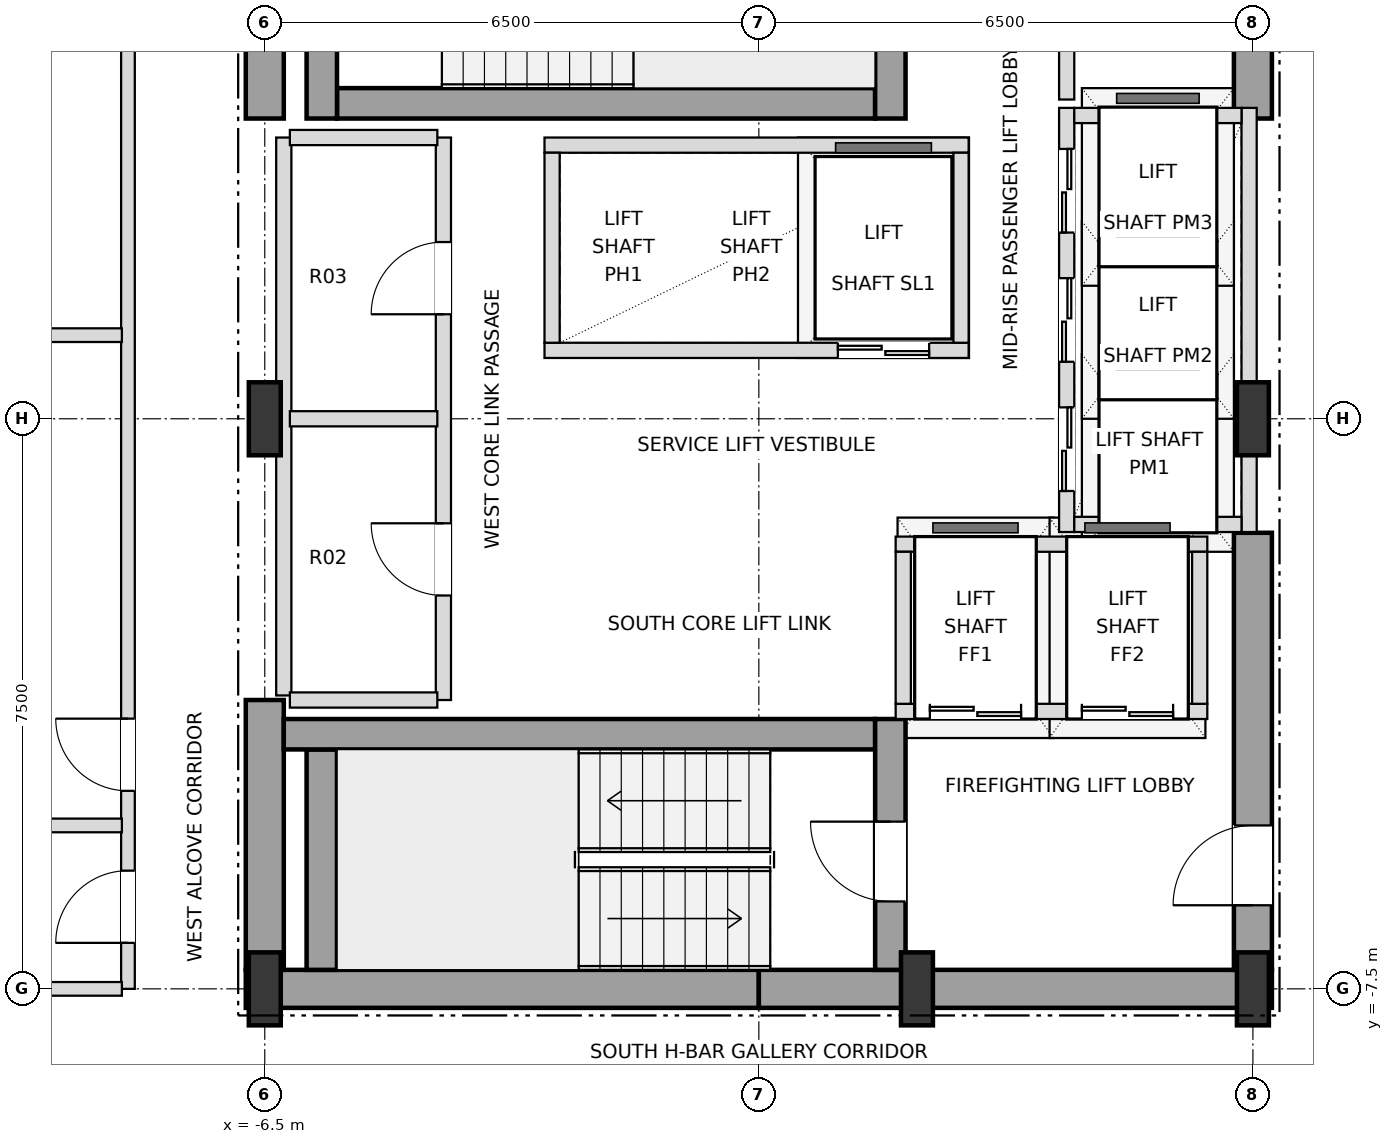
"""IFC4 building model, lengths in metres.
Left out: names, types, materials, properties, quantities, classifications, styles, units other than length and angle.
Written with IfcOpenShell. Run it as: python <this file> out.ifc"""

import sys

from ifc_helpers import new_model, si_unit, direction, frame, frame_2d, origin, origin_2d, place, context, subcontext, project, spatial, rectangle, i_section, extrude, element, fill, save


model = new_model("IFC4")
c1 = context("Model", 3, precision=1e-05, world=origin(), true_north=direction((0.0, 1.0)))
c2 = subcontext(c1, "Body", "Model", "MODEL_VIEW")
j1 = project(units=[si_unit("LENGTHUNIT", "METRE"), si_unit("PLANEANGLEUNIT", "RADIAN")], contexts=[c1])
p1 = place(None, origin())
s1 = spatial("IfcSite", under=j1, at=p1, CompositionType="ELEMENT")
p2 = place(p1, origin())
s2 = spatial("IfcBuilding", under=s1, at=p2, CompositionType="ELEMENT")
p3 = place(p2, frame((0.0, 0.0, 154.8)))
s3 = spatial("IfcBuildingStorey", under=s2, at=p3, CompositionType="ELEMENT", Elevation=154.8)
for number, where, z_axis, x_axis in (
    (1, (-6.5, -7.5, 0.0), (0.0, 0.0, 1.0), (1.0, 0.0, 0.0)),
    (2, (2.08, -7.5, 0.0), (0.0, 0.0, 1.0), (1.0, 0.0, 0.0)),
    (3, (6.5, -7.5, 0.0), (0.0, 0.0, 1.0), (1.0, 0.0, 0.0)),
    (4, (-6.5, 0.0, 0.0), (0.0, 0.0, 1.0), (1.0, 0.0, 0.0)),
    (5, (6.5, 0.0, 0.0), (0.0, 0.0, 1.0), (1.0, 0.0, 0.0)),
):
    element("IfcColumn", number, at=place(p3, frame(where, z_axis=z_axis, x_axis=x_axis)), inside=s3, PredefinedType="COLUMN", context=c2, shape_type="SweptSolid", body=[
        extrude(i_section(OverallWidth=0.42, OverallDepth=0.96, WebThickness=0.022, FlangeThickness=0.034, at=origin_2d()), origin(), (0.0, 0.0, 1.0), 3.6),
    ])
for number, where, z_axis, x_axis in (
    (6, (-6.75, -7.5, 0.0), (0.0, 0.0, 1.0), (1.0, 0.0, 0.0)),
    (7, (0.0, -7.5, 0.0), (0.0, 0.0, 1.0), (1.0, 0.0, 0.0)),
):
    element("IfcWall", number, at=place(p3, frame(where, z_axis=z_axis, x_axis=x_axis)), inside=s3, PredefinedType="SHEAR", context=c2, shape_type="SweptSolid", body=[
        extrude(rectangle(XDim=6.75, YDim=0.5, at=frame_2d((3.375, 0.0))), origin(), (0.0, 0.0, 1.0), 3.38),
    ])
p4 = place(p3, frame((-6.5, -7.25, 0.0), z_axis=(0.0, 0.0, 1.0), x_axis=(0.0, 1.0, 0.0)))
e8 = element("IfcWall", 8, at=p4, inside=s3, PredefinedType="SHEAR", context=c2, shape_type="SweptSolid", body=[
    extrude(rectangle(XDim=3.55, YDim=0.5, at=frame_2d((1.775, 0.0))), origin(), (0.0, 0.0, 1.0), 3.38),
])
p5 = place(p3, frame((-6.5, 3.95, 0.0), z_axis=(0.0, 0.0, 1.0), x_axis=(0.0, 1.0, 0.0)))
e9 = element("IfcWall", 9, at=p5, inside=s3, PredefinedType="SHEAR", context=c2, shape_type="SweptSolid", body=[
    extrude(rectangle(XDim=3.3, YDim=0.5, at=frame_2d((1.65, 0.0))), origin(), (0.0, 0.0, 1.0), 3.38),
])
p6 = place(p3, frame((6.5, -7.25, 0.0), z_axis=(0.0, 0.0, 1.0), x_axis=(0.0, 1.0, 0.0)))
e10 = element("IfcWall", 10, at=p6, inside=s3, PredefinedType="SHEAR", context=c2, shape_type="SweptSolid", body=[
    extrude(rectangle(XDim=5.75, YDim=0.5, at=frame_2d((2.875, 0.0))), origin(), (0.0, 0.0, 1.0), 3.38),
])
p7 = place(p6, frame((0.85, 0.0, 0.0)))
e11 = element("IfcOpeningElement", 11, at=p7, cuts=e10, PredefinedType="OPENING", context=c2, shape_type="SweptSolid", body=[
    extrude(rectangle(XDim=1.05, YDim=2.15, at=frame_2d((0.525, 1.075))), frame((0.0, 0.26, 0.0), z_axis=(0.0, -1.0, 0.0), x_axis=(1.0, 0.0, 0.0)), (0.0, 0.0, 1.0), 0.52),
])
p8 = place(p3, frame((6.5, 3.95, 0.0), z_axis=(0.0, 0.0, 1.0), x_axis=(0.0, 1.0, 0.0)))
e12 = element("IfcWall", 12, at=p8, inside=s3, PredefinedType="SHEAR", context=c2, shape_type="SweptSolid", body=[
    extrude(rectangle(XDim=3.3, YDim=0.5, at=frame_2d((1.65, 0.0))), origin(), (0.0, 0.0, 1.0), 3.38),
])
p9 = place(p3, frame((-5.75, -7.25, 0.0), z_axis=(0.0, 0.0, 1.0), x_axis=(0.0, 1.0, 0.0)))
e13 = element("IfcWall", 13, at=p9, inside=s3, PredefinedType="SHEAR", context=c2, shape_type="SweptSolid", body=[
    extrude(rectangle(XDim=2.9, YDim=0.4, at=frame_2d((1.45, 0.0))), origin(), (0.0, 0.0, 1.0), 3.38),
])
p10 = place(p3, frame((-6.25, -4.15, 0.0), z_axis=(0.0, 0.0, 1.0), x_axis=(1.0, 0.0, 0.0)))
e14 = element("IfcWall", 14, at=p10, inside=s3, PredefinedType="SHEAR", context=c2, shape_type="SweptSolid", body=[
    extrude(rectangle(XDim=7.78, YDim=0.4, at=frame_2d((3.89, 0.0))), origin(), (0.0, 0.0, 1.0), 3.38),
])
p11 = place(p3, frame((1.73, -7.25, 0.0), z_axis=(0.0, 0.0, 1.0), x_axis=(0.0, 1.0, 0.0)))
e15 = element("IfcWall", 15, at=p11, inside=s3, PredefinedType="SHEAR", context=c2, shape_type="SweptSolid", body=[
    extrude(rectangle(XDim=3.3, YDim=0.4, at=frame_2d((1.65, 0.0))), origin(), (0.0, 0.0, 1.0), 3.38),
])
p12 = place(p11, frame((0.9, 0.0, 0.0)))
e16 = element("IfcOpeningElement", 16, at=p12, cuts=e15, PredefinedType="OPENING", context=c2, shape_type="SweptSolid", body=[
    extrude(rectangle(XDim=1.05, YDim=2.15, at=frame_2d((0.525, 1.075))), frame((0.0, 0.21, 0.0), z_axis=(0.0, -1.0, 0.0), x_axis=(1.0, 0.0, 0.0)), (0.0, 0.0, 1.0), 0.42),
])
p13 = place(p3, frame((-5.55, 4.15, 0.0), z_axis=(0.0, 0.0, 1.0), x_axis=(1.0, 0.0, 0.0)))
e17 = element("IfcWall", 17, at=p13, inside=s3, PredefinedType="SHEAR", context=c2, shape_type="SweptSolid", body=[
    extrude(rectangle(XDim=7.08, YDim=0.4, at=frame_2d((3.54, 0.0))), origin(), (0.0, 0.0, 1.0), 3.38),
])
for number, where, z_axis, x_axis in (
    (18, (1.73, 3.95, 0.0), (0.0, 0.0, 1.0), (0.0, 1.0, 0.0)),
    (19, (-5.75, 3.95, 0.0), (0.0, 0.0, 1.0), (0.0, 1.0, 0.0)),
):
    element("IfcWall", number, at=place(p3, frame(where, z_axis=z_axis, x_axis=x_axis)), inside=s3, PredefinedType="SHEAR", context=c2, shape_type="SweptSolid", body=[
        extrude(rectangle(XDim=3.3, YDim=0.4, at=frame_2d((1.65, 0.0))), origin(), (0.0, 0.0, 1.0), 3.38),
    ])
p14 = place(p3, frame((4.05, -1.49, 0.0), z_axis=(0.0, 0.0, 1.0), x_axis=(0.0, 1.0, 0.0)))
e20 = element("IfcWall", 20, at=p14, inside=s3, PredefinedType="SOLIDWALL", context=c2, shape_type="SweptSolid", body=[
    extrude(rectangle(XDim=5.58, YDim=0.2, at=frame_2d((2.79, 0.0))), origin(), (0.0, 0.0, 1.0), 3.38),
])
p15 = place(p14, frame((0.54, 0.0, 0.0)))
e21 = element("IfcOpeningElement", 21, at=p15, cuts=e20, PredefinedType="OPENING", context=c2, shape_type="SweptSolid", body=[
    extrude(rectangle(XDim=1.1, YDim=2.15, at=frame_2d((0.55, 1.075))), frame((0.0, 0.11, 0.0), z_axis=(0.0, -1.0, 0.0), x_axis=(1.0, 0.0, 0.0)), (0.0, 0.0, 1.0), 0.22),
])
p16 = place(p14, frame((2.24, 0.0, 0.0)))
e22 = element("IfcOpeningElement", 22, at=p16, cuts=e20, PredefinedType="OPENING", context=c2, shape_type="SweptSolid", body=[
    extrude(rectangle(XDim=1.1, YDim=2.15, at=frame_2d((0.55, 1.075))), frame((0.0, 0.11, 0.0), z_axis=(0.0, -1.0, 0.0), x_axis=(1.0, 0.0, 0.0)), (0.0, 0.0, 1.0), 0.22),
])
p17 = place(p14, frame((3.94, 0.0, 0.0)))
e23 = element("IfcOpeningElement", 23, at=p17, cuts=e20, PredefinedType="OPENING", context=c2, shape_type="SweptSolid", body=[
    extrude(rectangle(XDim=1.1, YDim=2.15, at=frame_2d((0.55, 1.075))), frame((0.0, 0.11, 0.0), z_axis=(0.0, -1.0, 0.0), x_axis=(1.0, 0.0, 0.0)), (0.0, 0.0, 1.0), 0.22),
])
p18 = place(p3, frame((6.45, -1.49, 0.0), z_axis=(0.0, 0.0, 1.0), x_axis=(0.0, 1.0, 0.0)))
e24 = element("IfcWall", 24, at=p18, inside=s3, PredefinedType="SOLIDWALL", context=c2, shape_type="SweptSolid", body=[
    extrude(rectangle(XDim=5.58, YDim=0.2, at=frame_2d((2.79, 0.0))), origin(), (0.0, 0.0, 1.0), 2.816),
])
for number, where, z_axis, x_axis in (
    (25, (4.15, -1.39, 0.0), (0.0, 0.0, 1.0), (1.0, 0.0, 0.0)),
    (26, (4.15, 3.99, 0.0), (0.0, 0.0, 1.0), (1.0, 0.0, 0.0)),
):
    element("IfcWall", number, at=place(p3, frame(where, z_axis=z_axis, x_axis=x_axis)), inside=s3, PredefinedType="SOLIDWALL", context=c2, shape_type="SweptSolid", body=[
        extrude(rectangle(XDim=2.2, YDim=0.2, at=frame_2d((1.1, 0.0))), origin(), (0.0, 0.0, 1.0), 3.38),
    ])
p19 = place(p3, frame((-2.82, 0.9, 0.0), z_axis=(0.0, 0.0, 1.0), x_axis=(1.0, 0.0, 0.0)))
e27 = element("IfcWall", 27, at=p19, inside=s3, PredefinedType="SOLIDWALL", context=c2, shape_type="SweptSolid", body=[
    extrude(rectangle(XDim=5.58, YDim=0.2, at=frame_2d((2.79, 0.0))), origin(), (0.0, 0.0, 1.0), 3.38),
])
p20 = place(p19, frame((3.86, 0.0, 0.0)))
e28 = element("IfcOpeningElement", 28, at=p20, cuts=e27, PredefinedType="OPENING", context=c2, shape_type="SweptSolid", body=[
    extrude(rectangle(XDim=1.2, YDim=2.2, at=frame_2d((0.6, 1.1))), frame((0.0, 0.11, 0.0), z_axis=(0.0, -1.0, 0.0), x_axis=(1.0, 0.0, 0.0)), (0.0, 0.0, 1.0), 0.22),
])
p21 = place(p3, frame((-2.82, 3.6, 0.0), z_axis=(0.0, 0.0, 1.0), x_axis=(1.0, 0.0, 0.0)))
e29 = element("IfcWall", 29, at=p21, inside=s3, PredefinedType="SOLIDWALL", context=c2, shape_type="SweptSolid", body=[
    extrude(rectangle(XDim=5.58, YDim=0.2, at=frame_2d((2.79, 0.0))), origin(), (0.0, 0.0, 1.0), 3.38),
])
for number, where, z_axis, x_axis in (
    (30, (-2.72, 1.0, 0.0), (0.0, 0.0, 1.0), (0.0, 1.0, 0.0)),
    (31, (2.66, 1.0, 0.0), (0.0, 0.0, 1.0), (0.0, 1.0, 0.0)),
):
    element("IfcWall", number, at=place(p3, frame(where, z_axis=z_axis, x_axis=x_axis)), inside=s3, PredefinedType="SOLIDWALL", context=c2, shape_type="SweptSolid", body=[
        extrude(rectangle(XDim=2.5, YDim=0.2, at=frame_2d((1.25, 0.0))), origin(), (0.0, 0.0, 1.0), 3.38),
    ])
p22 = place(p3, frame((1.8, -3.85, 0.0), z_axis=(0.0, 0.0, 1.0), x_axis=(1.0, 0.0, 0.0)))
e32 = element("IfcWall", 32, at=p22, inside=s3, PredefinedType="SOLIDWALL", context=c2, shape_type="SweptSolid", body=[
    extrude(rectangle(XDim=4.1, YDim=0.2, at=frame_2d((2.05, 0.0))), origin(), (0.0, 0.0, 1.0), 3.38),
])
p23 = place(p22, frame((0.45, 0.0, 0.0)))
e33 = element("IfcOpeningElement", 33, at=p23, cuts=e32, PredefinedType="OPENING", context=c2, shape_type="SweptSolid", body=[
    extrude(rectangle(XDim=1.2, YDim=2.2, at=frame_2d((0.6, 1.1))), frame((0.0, 0.11, 0.0), z_axis=(0.0, -1.0, 0.0), x_axis=(1.0, 0.0, 0.0)), (0.0, 0.0, 1.0), 0.22),
])
p24 = place(p22, frame((2.45, 0.0, 0.0)))
e34 = element("IfcOpeningElement", 34, at=p24, cuts=e32, PredefinedType="OPENING", context=c2, shape_type="SweptSolid", body=[
    extrude(rectangle(XDim=1.2, YDim=2.2, at=frame_2d((0.6, 1.1))), frame((0.0, 0.11, 0.0), z_axis=(0.0, -1.0, 0.0), x_axis=(1.0, 0.0, 0.0)), (0.0, 0.0, 1.0), 0.22),
])
p25 = place(p3, frame((1.8, -1.65, 0.0), z_axis=(0.0, 0.0, 1.0), x_axis=(1.0, 0.0, 0.0)))
e35 = element("IfcWall", 35, at=p25, inside=s3, PredefinedType="SOLIDWALL", context=c2, shape_type="SweptSolid", body=[
    extrude(rectangle(XDim=4.1, YDim=0.2, at=frame_2d((2.05, 0.0))), origin(), (0.0, 0.0, 1.0), 3.38),
])
for number, where, z_axis, x_axis in (
    (36, (1.9, -3.75, 0.0), (0.0, 0.0, 1.0), (0.0, 1.0, 0.0)),
    (37, (5.8, -3.75, 0.0), (0.0, 0.0, 1.0), (0.0, 1.0, 0.0)),
):
    element("IfcWall", number, at=place(p3, frame(where, z_axis=z_axis, x_axis=x_axis)), inside=s3, PredefinedType="SOLIDWALL", context=c2, shape_type="SweptSolid", body=[
        extrude(rectangle(XDim=2.0, YDim=0.2, at=frame_2d((1.0, 0.0))), origin(), (0.0, 0.0, 1.0), 3.38),
    ])
p26 = place(p3, frame((-8.3, -7.5, 0.0), z_axis=(0.0, 0.0, 1.0), x_axis=(0.0, 1.0, 0.0)))
e38 = element("IfcWall", 38, at=p26, inside=s3, PredefinedType="PARTITIONING", context=c2, shape_type="SweptSolid", body=[
    extrude(rectangle(XDim=15.0, YDim=0.18, at=frame_2d((7.5, 0.0))), origin(), (0.0, 0.0, 1.0), 3.38),
])
p27 = place(p26, frame((0.605, 0.0, 0.0)))
e39 = element("IfcOpeningElement", 39, at=p27, cuts=e38, PredefinedType="OPENING", context=c2, shape_type="SweptSolid", body=[
    extrude(rectangle(XDim=0.95, YDim=2.15, at=frame_2d((0.475, 1.075))), frame((0.0, 0.1, 0.0), z_axis=(0.0, -1.0, 0.0), x_axis=(1.0, 0.0, 0.0)), (0.0, 0.0, 1.0), 0.2),
])
p28 = place(p26, frame((2.605, 0.0, 0.0)))
e40 = element("IfcOpeningElement", 40, at=p28, cuts=e38, PredefinedType="OPENING", context=c2, shape_type="SweptSolid", body=[
    extrude(rectangle(XDim=0.95, YDim=2.15, at=frame_2d((0.475, 1.075))), frame((0.0, 0.1, 0.0), z_axis=(0.0, -1.0, 0.0), x_axis=(1.0, 0.0, 0.0)), (0.0, 0.0, 1.0), 0.2),
])
p29 = place(p3, frame((-6.25, -3.64, 0.0), z_axis=(0.0, 0.0, 1.0), x_axis=(0.0, 1.0, 0.0)))
e41 = element("IfcWall", 41, at=p29, inside=s3, PredefinedType="SOLIDWALL", context=c2, shape_type="SweptSolid", body=[
    extrude(rectangle(XDim=7.34, YDim=0.2, at=frame_2d((3.67, 0.0))), origin(), (0.0, 0.0, 1.0), 3.38),
])
p30 = place(p3, frame((-4.15, -3.7, 0.0), z_axis=(0.0, 0.0, 1.0), x_axis=(0.0, 1.0, 0.0)))
e42 = element("IfcWall", 42, at=p30, inside=s3, PredefinedType="SOLIDWALL", context=c2, shape_type="SweptSolid", body=[
    extrude(rectangle(XDim=7.4, YDim=0.2, at=frame_2d((3.7, 0.0))), origin(), (0.0, 0.0, 1.0), 3.38),
])
p31 = place(p30, frame((1.375, 0.0, 0.0)))
e43 = element("IfcOpeningElement", 43, at=p31, cuts=e42, PredefinedType="OPENING", context=c2, shape_type="SweptSolid", body=[
    extrude(rectangle(XDim=0.95, YDim=2.15, at=frame_2d((0.475, 1.075))), frame((0.0, 0.11, 0.0), z_axis=(0.0, -1.0, 0.0), x_axis=(1.0, 0.0, 0.0)), (0.0, 0.0, 1.0), 0.22),
])
p32 = place(p30, frame((5.075, 0.0, 0.0)))
e44 = element("IfcOpeningElement", 44, at=p32, cuts=e42, PredefinedType="OPENING", context=c2, shape_type="SweptSolid", body=[
    extrude(rectangle(XDim=0.95, YDim=2.15, at=frame_2d((0.475, 1.075))), frame((0.0, 0.11, 0.0), z_axis=(0.0, -1.0, 0.0), x_axis=(1.0, 0.0, 0.0)), (0.0, 0.0, 1.0), 0.22),
])
p33 = place(p3, frame((4.05, 4.2, 0.0), z_axis=(0.0, 0.0, 1.0), x_axis=(0.0, 1.0, 0.0)))
e45 = element("IfcWall", 45, at=p33, inside=s3, PredefinedType="SOLIDWALL", context=c2, shape_type="SweptSolid", body=[
    extrude(rectangle(XDim=3.05, YDim=0.2, at=frame_2d((1.525, 0.0))), origin(), (0.0, 0.0, 1.0), 3.38),
])
p34 = place(p33, frame((0.975, 0.0, 0.0)))
e46 = element("IfcOpeningElement", 46, at=p34, cuts=e45, PredefinedType="OPENING", context=c2, shape_type="SweptSolid", body=[
    extrude(rectangle(XDim=0.95, YDim=2.15, at=frame_2d((0.475, 1.075))), frame((0.0, 0.11, 0.0), z_axis=(0.0, -1.0, 0.0), x_axis=(1.0, 0.0, 0.0)), (0.0, 0.0, 1.0), 0.22),
])
p35 = place(p3, frame((-20.15, -7.5, 0.0), z_axis=(0.0, 0.0, 1.0), x_axis=(1.0, 0.0, 0.0)))
e47 = element("IfcWall", 47, at=p35, inside=s3, PredefinedType="PARTITIONING", context=c2, shape_type="SweptSolid", body=[
    extrude(rectangle(XDim=11.77, YDim=0.18, at=frame_2d((5.885, 0.0))), origin(), (0.0, 0.0, 1.0), 2.816),
])
p36 = place(p3, frame((-20.07, -5.35, 0.0), z_axis=(0.0, 0.0, 1.0), x_axis=(1.0, 0.0, 0.0)))
e48 = element("IfcWall", 48, at=p36, inside=s3, PredefinedType="PARTITIONING", context=c2, shape_type="SweptSolid", body=[
    extrude(rectangle(XDim=11.69, YDim=0.18, at=frame_2d((5.845, 0.0))), origin(), (0.0, 0.0, 1.0), 2.816),
])
for number, where, z_axis, x_axis in (
    (49, (-6.17, -3.7, 0.0), (0.0, 0.0, 1.0), (1.0, 0.0, 0.0)),
    (50, (-6.17, 0.0, 0.0), (0.0, 0.0, 1.0), (1.0, 0.0, 0.0)),
):
    element("IfcWall", number, at=place(p3, frame(where, z_axis=z_axis, x_axis=x_axis)), inside=s3, PredefinedType="SOLIDWALL", context=c2, shape_type="SweptSolid", body=[
        extrude(rectangle(XDim=1.94, YDim=0.2, at=frame_2d((0.97, 0.0))), origin(), (0.0, 0.0, 1.0), 3.38),
    ])
p37 = place(p3, frame((-20.07, 1.1, 0.0), z_axis=(0.0, 0.0, 1.0), x_axis=(1.0, 0.0, 0.0)))
e51 = element("IfcWall", 51, at=p37, inside=s3, PredefinedType="PARTITIONING", context=c2, shape_type="SweptSolid", body=[
    extrude(rectangle(XDim=11.69, YDim=0.18, at=frame_2d((5.845, 0.0))), origin(), (0.0, 0.0, 1.0), 2.816),
])
p38 = place(p37, frame((5.375, 0.0, 0.0)))
e52 = element("IfcOpeningElement", 52, at=p38, cuts=e51, PredefinedType="OPENING", context=c2, shape_type="SweptSolid", body=[
    extrude(rectangle(XDim=0.95, YDim=2.15, at=frame_2d((0.475, 1.075))), frame((0.0, 0.1, 0.0), z_axis=(0.0, -1.0, 0.0), x_axis=(1.0, 0.0, 0.0)), (0.0, 0.0, 1.0), 0.2),
])
p39 = place(p3, frame((-6.17, 3.7, 0.0), z_axis=(0.0, 0.0, 1.0), x_axis=(1.0, 0.0, 0.0)))
e53 = element("IfcWall", 53, at=p39, inside=s3, PredefinedType="SOLIDWALL", context=c2, shape_type="SweptSolid", body=[
    extrude(rectangle(XDim=1.94, YDim=0.2, at=frame_2d((0.97, 0.0))), origin(), (0.0, 0.0, 1.0), 3.38),
])
p40 = place(p7, origin())
e54 = element("IfcDoor", 54, at=p40, inside=s3, OperationType="SINGLE_SWING_LEFT", PredefinedType="DOOR", context=c2, shape_type="SweptSolid", body=[
    extrude(rectangle(XDim=1.05, YDim=2.15, at=frame_2d((0.525, 1.075))), frame((0.0, 0.025, 0.0), z_axis=(0.0, -1.0, 0.0), x_axis=(1.0, 0.0, 0.0)), (0.0, 0.0, 1.0), 0.05),
])
fill(e11, e54)
p41 = place(p12, origin())
e55 = element("IfcDoor", 55, at=p41, inside=s3, OperationType="SINGLE_SWING_RIGHT", PredefinedType="DOOR", context=c2, shape_type="SweptSolid", body=[
    extrude(rectangle(XDim=1.05, YDim=2.15, at=frame_2d((0.525, 1.075))), frame((0.0, 0.025, 0.0), z_axis=(0.0, -1.0, 0.0), x_axis=(1.0, 0.0, 0.0)), (0.0, 0.0, 1.0), 0.05),
])
fill(e16, e55)
p42 = place(p15, origin())
e56 = element("IfcDoor", 56, at=p42, inside=s3, OperationType="DOUBLE_DOOR_SLIDING", PredefinedType="DOOR", context=c2, shape_type="SweptSolid", body=[
    extrude(rectangle(XDim=1.1, YDim=2.15, at=frame_2d((0.55, 1.075))), frame((0.0, 0.025, 0.0), z_axis=(0.0, -1.0, 0.0), x_axis=(1.0, 0.0, 0.0)), (0.0, 0.0, 1.0), 0.05),
])
fill(e21, e56)
p43 = place(p16, origin())
e57 = element("IfcDoor", 57, at=p43, inside=s3, OperationType="DOUBLE_DOOR_SLIDING", PredefinedType="DOOR", context=c2, shape_type="SweptSolid", body=[
    extrude(rectangle(XDim=1.1, YDim=2.15, at=frame_2d((0.55, 1.075))), frame((0.0, 0.025, 0.0), z_axis=(0.0, -1.0, 0.0), x_axis=(1.0, 0.0, 0.0)), (0.0, 0.0, 1.0), 0.05),
])
fill(e22, e57)
p44 = place(p17, origin())
e58 = element("IfcDoor", 58, at=p44, inside=s3, OperationType="DOUBLE_DOOR_SLIDING", PredefinedType="DOOR", context=c2, shape_type="SweptSolid", body=[
    extrude(rectangle(XDim=1.1, YDim=2.15, at=frame_2d((0.55, 1.075))), frame((0.0, 0.025, 0.0), z_axis=(0.0, -1.0, 0.0), x_axis=(1.0, 0.0, 0.0)), (0.0, 0.0, 1.0), 0.05),
])
fill(e23, e58)
p45 = place(p20, origin())
e59 = element("IfcDoor", 59, at=p45, inside=s3, OperationType="DOUBLE_DOOR_SLIDING", PredefinedType="DOOR", context=c2, shape_type="SweptSolid", body=[
    extrude(rectangle(XDim=1.2, YDim=2.2, at=frame_2d((0.6, 1.1))), frame((0.0, 0.025, 0.0), z_axis=(0.0, -1.0, 0.0), x_axis=(1.0, 0.0, 0.0)), (0.0, 0.0, 1.0), 0.05),
])
fill(e28, e59)
p46 = place(p23, origin())
e60 = element("IfcDoor", 60, at=p46, inside=s3, OperationType="DOUBLE_DOOR_SLIDING", PredefinedType="DOOR", context=c2, shape_type="SweptSolid", body=[
    extrude(rectangle(XDim=1.2, YDim=2.2, at=frame_2d((0.6, 1.1))), frame((0.0, 0.025, 0.0), z_axis=(0.0, -1.0, 0.0), x_axis=(1.0, 0.0, 0.0)), (0.0, 0.0, 1.0), 0.05),
])
fill(e33, e60)
p47 = place(p24, origin())
e61 = element("IfcDoor", 61, at=p47, inside=s3, OperationType="DOUBLE_DOOR_SLIDING", PredefinedType="DOOR", context=c2, shape_type="SweptSolid", body=[
    extrude(rectangle(XDim=1.2, YDim=2.2, at=frame_2d((0.6, 1.1))), frame((0.0, 0.025, 0.0), z_axis=(0.0, -1.0, 0.0), x_axis=(1.0, 0.0, 0.0)), (0.0, 0.0, 1.0), 0.05),
])
fill(e34, e61)
p48 = place(p31, origin())
e62 = element("IfcDoor", 62, at=p48, inside=s3, OperationType="SINGLE_SWING_RIGHT", PredefinedType="DOOR", context=c2, shape_type="SweptSolid", body=[
    extrude(rectangle(XDim=0.95, YDim=2.15, at=frame_2d((0.475, 1.075))), frame((0.0, 0.025, 0.0), z_axis=(0.0, -1.0, 0.0), x_axis=(1.0, 0.0, 0.0)), (0.0, 0.0, 1.0), 0.05),
])
fill(e43, e62)
p49 = place(p32, origin())
e63 = element("IfcDoor", 63, at=p49, inside=s3, OperationType="SINGLE_SWING_LEFT", PredefinedType="DOOR", context=c2, shape_type="SweptSolid", body=[
    extrude(rectangle(XDim=0.95, YDim=2.15, at=frame_2d((0.475, 1.075))), frame((0.0, 0.025, 0.0), z_axis=(0.0, -1.0, 0.0), x_axis=(1.0, 0.0, 0.0)), (0.0, 0.0, 1.0), 0.05),
])
fill(e44, e63)
p50 = place(p27, origin())
e64 = element("IfcDoor", 64, at=p50, inside=s3, OperationType="SINGLE_SWING_LEFT", PredefinedType="DOOR", context=c2, shape_type="SweptSolid", body=[
    extrude(rectangle(XDim=0.95, YDim=2.15, at=frame_2d((0.475, 1.075))), frame((0.0, 0.025, 0.0), z_axis=(0.0, -1.0, 0.0), x_axis=(1.0, 0.0, 0.0)), (0.0, 0.0, 1.0), 0.05),
])
fill(e39, e64)
p51 = place(p28, origin())
e65 = element("IfcDoor", 65, at=p51, inside=s3, OperationType="SINGLE_SWING_RIGHT", PredefinedType="DOOR", context=c2, shape_type="SweptSolid", body=[
    extrude(rectangle(XDim=0.95, YDim=2.15, at=frame_2d((0.475, 1.075))), frame((0.0, 0.025, 0.0), z_axis=(0.0, -1.0, 0.0), x_axis=(1.0, 0.0, 0.0)), (0.0, 0.0, 1.0), 0.05),
])
fill(e40, e65)
save(model, sys.argv[1])
